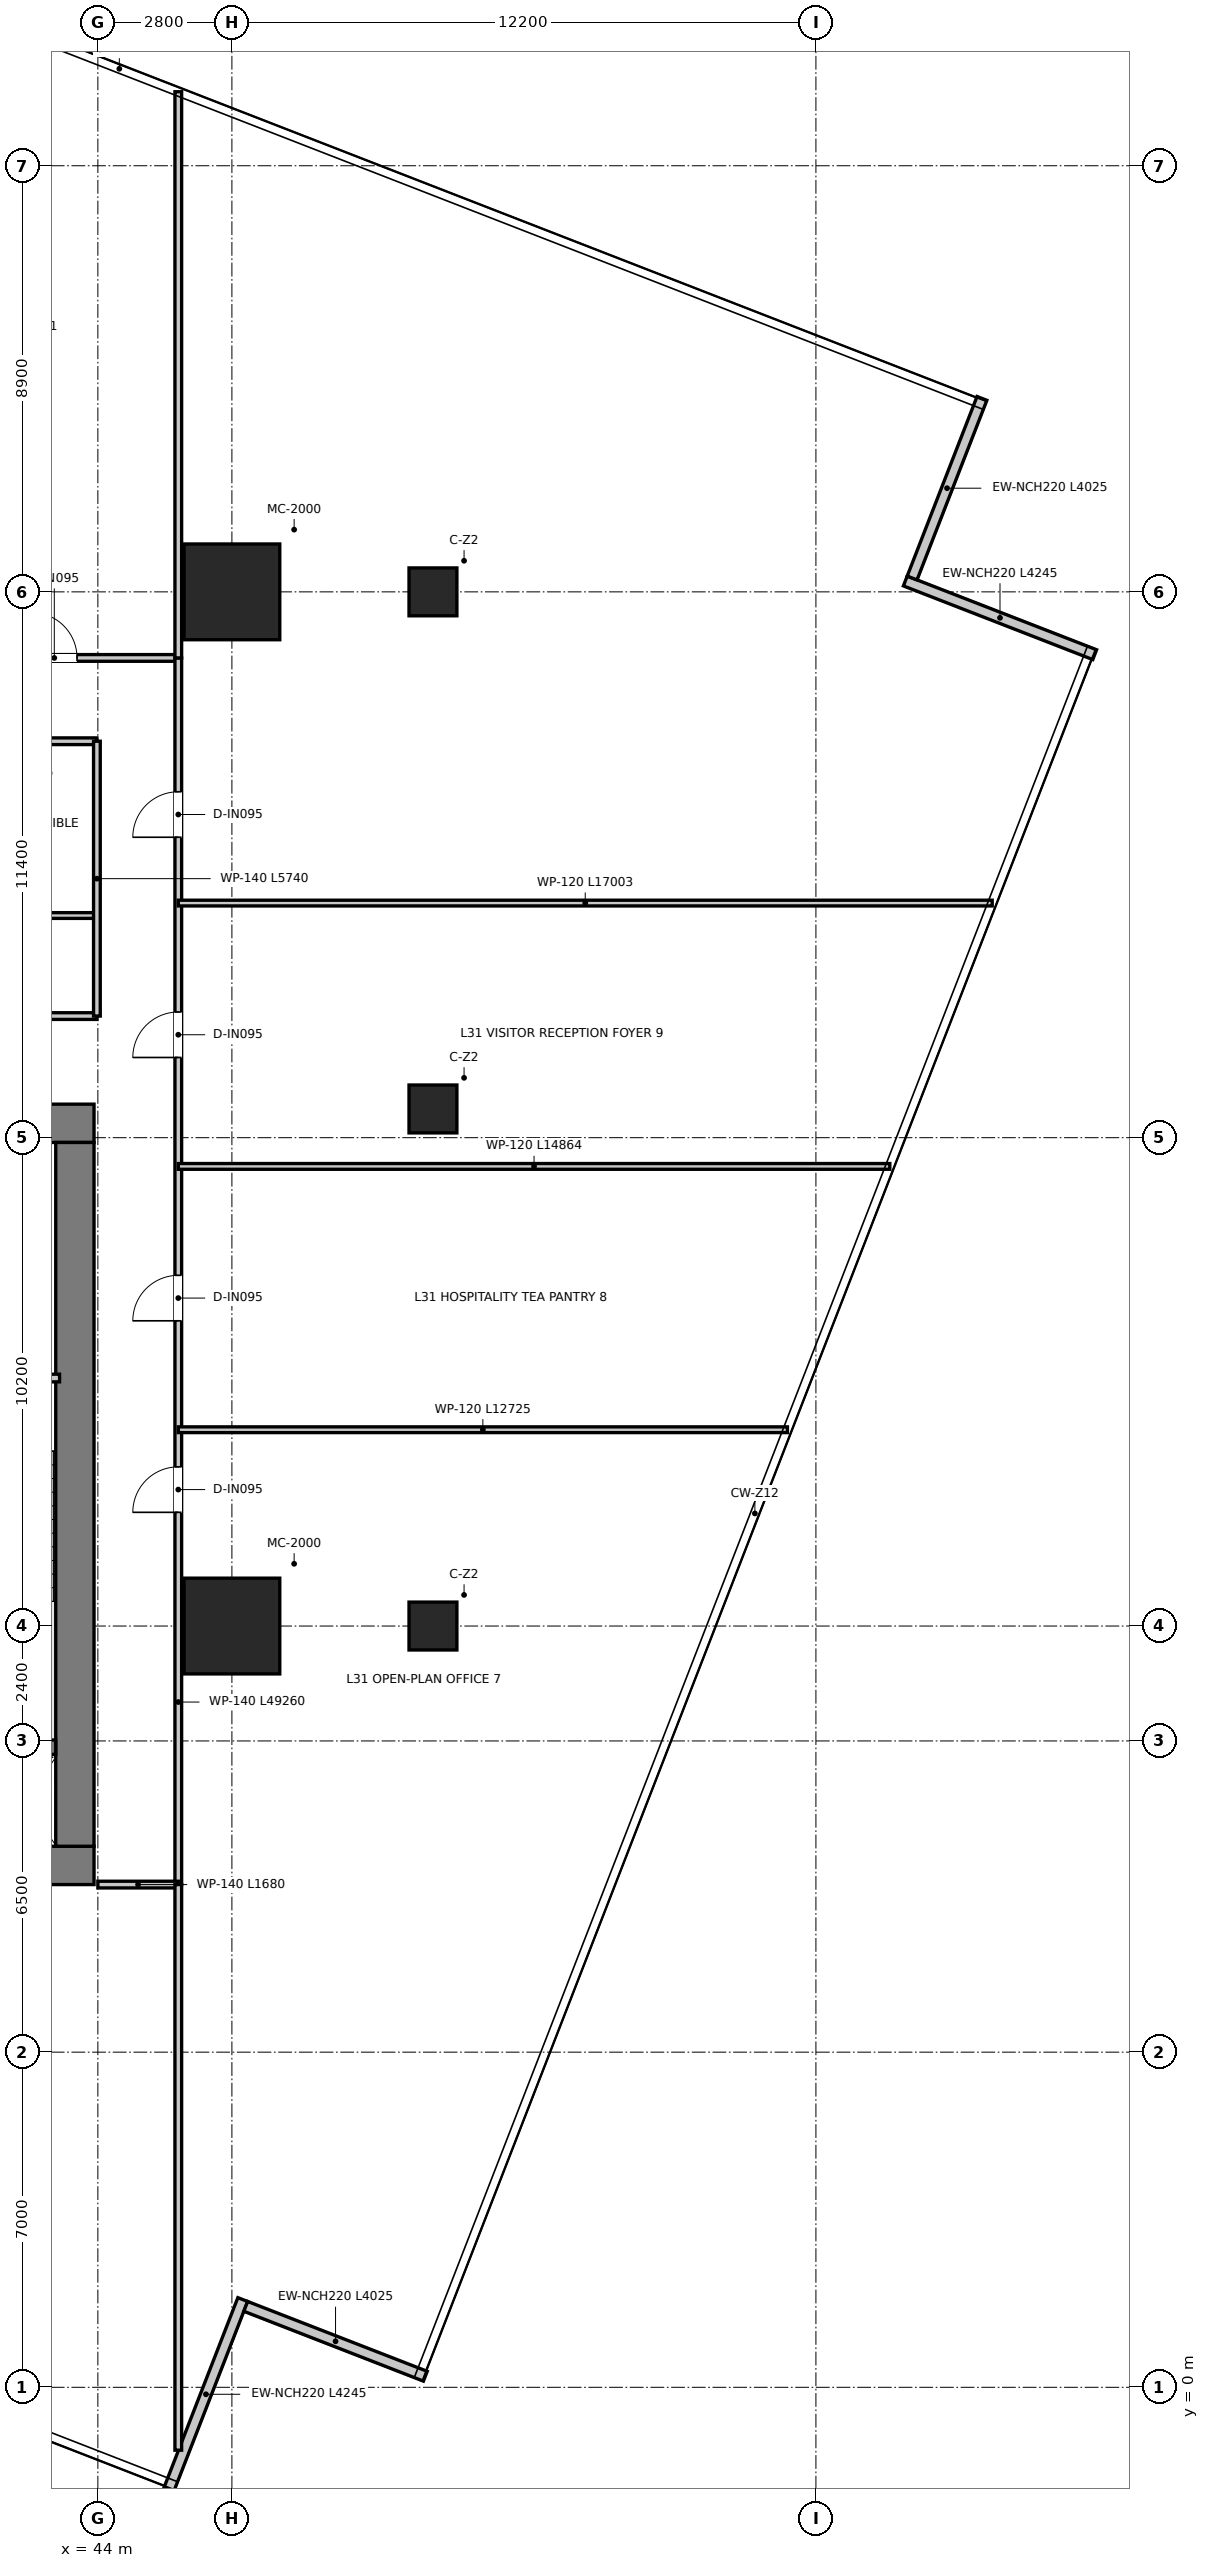
"""IFC4 building model, lengths in metres.
Left out: names, types, materials, properties, quantities, classifications, styles, units other than length and angle.
Written with IfcOpenShell. Run it as: python <this file> out.ifc"""

import sys

from ifc_helpers import new_model, si_unit, direction, frame, frame_2d, origin, origin_2d, place, context, subcontext, project, spatial, rectangle, extrude, source, transform, mapped, element, fill, save


model = new_model("IFC4")
c1 = context("Model", 3, precision=1e-05, world=origin(), true_north=direction((0.0, 1.0)))
c2 = subcontext(c1, "Body", "Model", "MODEL_VIEW")
j1 = project(units=[si_unit("LENGTHUNIT", "METRE"), si_unit("PLANEANGLEUNIT", "RADIAN")], contexts=[c1])
p1 = place(None, origin())
s1 = spatial("IfcSite", under=j1, at=p1, CompositionType="ELEMENT")
p2 = place(p1, origin())
s2 = spatial("IfcBuilding", under=s1, at=p2, CompositionType="ELEMENT")
p3 = place(p2, frame((0.0, 0.0, 129.55)))
s3 = spatial("IfcBuildingStorey", under=s2, at=p3, CompositionType="ELEMENT", Elevation=129.55)
p4 = place(p3, frame((28.08, 10.9, 0.0), z_axis=(0.0, 0.0, 1.0), x_axis=(1.0, 0.0, 0.0)))
e1 = element("IfcWall", 1, at=p4, inside=s3, PredefinedType="SHEAR", context=c2, shape_type="SweptSolid", body=[
    extrude(rectangle(XDim=15.84, YDim=0.8, at=frame_2d((7.92, 0.0))), origin(), (0.0, 0.0, 1.0), 3.95),
])
p5 = place(p3, frame((28.08, 26.4, 0.0), z_axis=(0.0, 0.0, 1.0), x_axis=(1.0, 0.0, 0.0)))
e2 = element("IfcWall", 2, at=p5, inside=s3, PredefinedType="SHEAR", context=c2, shape_type="SweptSolid", body=[
    extrude(rectangle(XDim=15.84, YDim=0.8, at=frame_2d((7.92, 0.0))), origin(), (0.0, 0.0, 1.0), 3.95),
])
p6 = place(p5, frame((7.22, 0.0, 0.0)))
e3 = element("IfcOpeningElement", 3, at=p6, cuts=e2, PredefinedType="OPENING", context=c2, shape_type="SweptSolid", body=[
    extrude(rectangle(XDim=1.4, YDim=2.2, at=frame_2d((0.7, 1.1))), frame((0.0, 0.41, 0.0), z_axis=(0.0, -1.0, 0.0), x_axis=(1.0, 0.0, 0.0)), (0.0, 0.0, 1.0), 0.82),
])
p7 = place(p5, frame((1.775, 0.0, 0.0)))
e4 = element("IfcOpeningElement", 4, at=p7, cuts=e2, PredefinedType="OPENING", context=c2, shape_type="SweptSolid", body=[
    extrude(rectangle(XDim=1.05, YDim=2.1, at=frame_2d((0.525, 1.05))), frame((0.0, 0.41, 0.0), z_axis=(0.0, -1.0, 0.0), x_axis=(1.0, 0.0, 0.0)), (0.0, 0.0, 1.0), 0.82),
])
p8 = place(p5, frame((13.015, 0.0, 0.0)))
e5 = element("IfcOpeningElement", 5, at=p8, cuts=e2, PredefinedType="OPENING", context=c2, shape_type="SweptSolid", body=[
    extrude(rectangle(XDim=1.05, YDim=2.1, at=frame_2d((0.525, 1.05))), frame((0.0, 0.41, 0.0), z_axis=(0.0, -1.0, 0.0), x_axis=(1.0, 0.0, 0.0)), (0.0, 0.0, 1.0), 0.82),
])
p9 = place(p3, frame((43.52, 11.3, 0.0), z_axis=(0.0, 0.0, 1.0), x_axis=(0.0, 1.0, 0.0)))
e6 = element("IfcWall", 6, at=p9, inside=s3, PredefinedType="SHEAR", context=c2, shape_type="SweptSolid", body=[
    extrude(rectangle(XDim=14.7, YDim=0.8, at=frame_2d((7.35, 0.0))), origin(), (0.0, 0.0, 1.0), 3.95),
])
p10 = place(p3, frame((40.02, 13.37, 0.0), z_axis=(0.0, 0.0, 1.0), x_axis=(1.0, 0.0, 0.0)))
e7 = element("IfcWall", 7, at=p10, inside=s3, PredefinedType="SHEAR", context=c2, shape_type="SweptSolid", body=[
    extrude(rectangle(XDim=3.1, YDim=0.3, at=frame_2d((1.55, 0.0))), origin(), (0.0, 0.0, 1.0), 3.95),
])
m1 = source(origin(), c2, "Body", "SweptSolid", [
    extrude(rectangle(XDim=2.0, YDim=2.0, at=origin_2d()), origin(), (0.0, 0.0, 1.0), 3.95),
])
for number, where, z_axis, x_axis in (
    (8, (46.8, 15.9, 0.0), (0.0, 0.0, 1.0), (1.0, 0.0, 0.0)),
    (9, (46.8, 37.5, 0.0), (0.0, 0.0, 1.0), (1.0, 0.0, 0.0)),
):
    element("IfcColumn", number, at=place(p3, frame(where, z_axis=z_axis, x_axis=x_axis)), inside=s3, PredefinedType="USERDEFINED", context=c2, shape_type="MappedRepresentation", body=[
        mapped(m1, transform((0.0, 0.0, 0.0), x_axis=(1.0, 0.0, 0.0), y_axis=(0.0, 1.0, 0.0), z_axis=(0.0, 0.0, 1.0), scale=1.0)),
    ])
m2 = source(origin(), c2, "Body", "SweptSolid", [
    extrude(rectangle(XDim=1.0, YDim=1.0, at=origin_2d()), origin(), (0.0, 0.0, 1.0), 3.95),
])
for number, where, z_axis, x_axis in (
    (10, (51.0, 37.5, 0.0), (0.0, 0.0, 1.0), (1.0, 0.0, 0.0)),
    (11, (51.0, 26.7, 0.0), (0.0, 0.0, 1.0), (1.0, 0.0, 0.0)),
    (12, (51.0, 15.9, 0.0), (0.0, 0.0, 1.0), (1.0, 0.0, 0.0)),
):
    element("IfcColumn", number, at=place(p3, frame(where, z_axis=z_axis, x_axis=x_axis)), inside=s3, PredefinedType="COLUMN", context=c2, shape_type="MappedRepresentation", body=[
        mapped(m2, transform((0.0, 0.0, 0.0), x_axis=(1.0, 0.0, 0.0), y_axis=(0.0, 1.0, 0.0), z_axis=(0.0, 0.0, 1.0), scale=1.0)),
    ])
p11 = place(p3, frame((45.488, -2.124, 0.0), z_axis=(0.0, 0.0, 1.0), x_axis=(0.362429609335, 0.932011147078, 0.0)))
e13 = element("IfcWall", 13, at=p11, inside=s3, PredefinedType="ELEMENTEDWALL", context=c2, shape_type="SweptSolid", body=[
    extrude(rectangle(XDim=4.245, YDim=0.22, at=frame_2d((2.123, 0.0))), origin(), (0.0, 0.0, 1.0), 3.67),
])
p12 = place(p3, frame((47.09, 1.69, 0.0), z_axis=(0.0, 0.0, 1.0), x_axis=(0.932010363197, -0.362431625129, 0.0)))
e14 = element("IfcWall", 14, at=p12, inside=s3, PredefinedType="ELEMENTEDWALL", context=c2, shape_type="SweptSolid", body=[
    extrude(rectangle(XDim=4.025, YDim=0.22, at=frame_2d((2.012, 0.0))), origin(), (0.0, 0.0, 1.0), 3.67),
])
p13 = place(p3, frame((64.824, 36.188, 0.0), z_axis=(0.0, 0.0, 1.0), x_axis=(-0.932003592198, 0.362449036596, 0.0)))
e15 = element("IfcWall", 15, at=p13, inside=s3, PredefinedType="ELEMENTEDWALL", context=c2, shape_type="SweptSolid", body=[
    extrude(rectangle(XDim=4.245, YDim=0.22, at=frame_2d((2.123, 0.0))), origin(), (0.0, 0.0, 1.0), 3.67),
])
p14 = place(p3, frame((61.01, 37.79, 0.0), z_axis=(0.0, 0.0, 1.0), x_axis=(0.362431625129, 0.932010363197, 0.0)))
e16 = element("IfcWall", 16, at=p14, inside=s3, PredefinedType="ELEMENTEDWALL", context=c2, shape_type="SweptSolid", body=[
    extrude(rectangle(XDim=4.025, YDim=0.22, at=frame_2d((2.012, 0.0))), origin(), (0.0, 0.0, 1.0), 3.67),
])
p15 = place(p3, frame((40.04, 21.08, 0.0), z_axis=(0.0, 0.0, 1.0), x_axis=(1.0, 0.0, 0.0)))
e17 = element("IfcWall", 17, at=p15, inside=s3, PredefinedType="PARTITIONING", context=c2, shape_type="SweptSolid", body=[
    extrude(rectangle(XDim=3.16, YDim=0.16, at=frame_2d((1.58, 0.0))), origin(), (0.0, 0.0, 1.0), 3.67),
])
p16 = place(p15, frame((1.055, 0.0, 0.0)))
e18 = element("IfcOpeningElement", 18, at=p16, cuts=e17, PredefinedType="OPENING", context=c2, shape_type="SweptSolid", body=[
    extrude(rectangle(XDim=1.05, YDim=2.1, at=frame_2d((0.525, 1.05))), frame((0.0, 0.09, 0.0), z_axis=(0.0, -1.0, 0.0), x_axis=(1.0, 0.0, 0.0)), (0.0, 0.0, 1.0), 0.18),
])
p17 = place(p3, frame((28.02, 28.64, 0.0), z_axis=(0.0, 0.0, 1.0), x_axis=(1.0, 0.0, 0.0)))
e19 = element("IfcWall", 19, at=p17, inside=s3, PredefinedType="PARTITIONING", context=c2, shape_type="SweptSolid", body=[
    extrude(rectangle(XDim=15.96, YDim=0.14, at=frame_2d((7.98, 0.0))), origin(), (0.0, 0.0, 1.0), 3.08),
])
p18 = place(p17, frame((7.455, 0.0, 0.0)))
e20 = element("IfcOpeningElement", 20, at=p18, cuts=e19, PredefinedType="OPENING", context=c2, shape_type="SweptSolid", body=[
    extrude(rectangle(XDim=1.05, YDim=2.15, at=frame_2d((0.525, 1.075))), frame((0.0, 0.08, 0.0), z_axis=(0.0, -1.0, 0.0), x_axis=(1.0, 0.0, 0.0)), (0.0, 0.0, 1.0), 0.16),
])
p19 = place(p3, frame((28.02, 30.74, 0.0), z_axis=(0.0, 0.0, 1.0), x_axis=(1.0, 0.0, 0.0)))
e21 = element("IfcWall", 21, at=p19, inside=s3, PredefinedType="PARTITIONING", context=c2, shape_type="SweptSolid", body=[
    extrude(rectangle(XDim=15.96, YDim=0.12, at=frame_2d((7.98, 0.0))), origin(), (0.0, 0.0, 1.0), 3.08),
])
p20 = place(p3, frame((28.02, 34.38, 0.0), z_axis=(0.0, 0.0, 1.0), x_axis=(1.0, 0.0, 0.0)))
e22 = element("IfcWall", 22, at=p20, inside=s3, PredefinedType="PARTITIONING", context=c2, shape_type="SweptSolid", body=[
    extrude(rectangle(XDim=15.96, YDim=0.14, at=frame_2d((7.98, 0.0))), origin(), (0.0, 0.0, 1.0), 3.08),
])
p21 = place(p20, frame((7.83, 0.0, 0.0)))
e23 = element("IfcOpeningElement", 23, at=p21, cuts=e22, PredefinedType="OPENING", context=c2, shape_type="SweptSolid", body=[
    extrude(rectangle(XDim=0.9, YDim=2.1, at=frame_2d((0.45, 1.05))), frame((0.0, 0.08, 0.0), z_axis=(0.0, -1.0, 0.0), x_axis=(1.0, 0.0, 0.0)), (0.0, 0.0, 1.0), 0.16),
])
p22 = place(p20, frame((11.03, 0.0, 0.0)))
e24 = element("IfcOpeningElement", 24, at=p22, cuts=e22, PredefinedType="OPENING", context=c2, shape_type="SweptSolid", body=[
    extrude(rectangle(XDim=0.9, YDim=2.1, at=frame_2d((0.45, 1.05))), frame((0.0, 0.08, 0.0), z_axis=(0.0, -1.0, 0.0), x_axis=(1.0, 0.0, 0.0)), (0.0, 0.0, 1.0), 0.16),
])
p23 = place(p20, frame((14.055, 0.0, 0.0)))
e25 = element("IfcOpeningElement", 25, at=p23, cuts=e22, PredefinedType="OPENING", context=c2, shape_type="SweptSolid", body=[
    extrude(rectangle(XDim=0.95, YDim=2.1, at=frame_2d((0.475, 1.05))), frame((0.0, 0.08, 0.0), z_axis=(0.0, -1.0, 0.0), x_axis=(1.0, 0.0, 0.0)), (0.0, 0.0, 1.0), 0.16),
])
p24 = place(p20, frame((2.855, 0.0, 0.0)))
e26 = element("IfcOpeningElement", 26, at=p24, cuts=e22, PredefinedType="OPENING", context=c2, shape_type="SweptSolid", body=[
    extrude(rectangle(XDim=0.95, YDim=2.1, at=frame_2d((0.475, 1.05))), frame((0.0, 0.08, 0.0), z_axis=(0.0, -1.0, 0.0), x_axis=(1.0, 0.0, 0.0)), (0.0, 0.0, 1.0), 0.16),
])
p25 = place(p3, frame((43.98, 28.64, 0.0), z_axis=(0.0, 0.0, 1.0), x_axis=(0.0, 1.0, 0.0)))
e27 = element("IfcWall", 27, at=p25, inside=s3, PredefinedType="PARTITIONING", context=c2, shape_type="SweptSolid", body=[
    extrude(rectangle(XDim=5.74, YDim=0.14, at=frame_2d((2.87, 0.0))), origin(), (0.0, 0.0, 1.0), 3.27),
])
p26 = place(p3, frame((26.32, 36.12, 0.0), z_axis=(0.0, 0.0, 1.0), x_axis=(1.0, 0.0, 0.0)))
e28 = element("IfcWall", 28, at=p26, inside=s3, PredefinedType="PARTITIONING", context=c2, shape_type="SweptSolid", body=[
    extrude(rectangle(XDim=19.36, YDim=0.14, at=frame_2d((9.68, 0.0))), origin(), (0.0, 0.0, 1.0), 3.08),
])
p27 = place(p26, frame((3.115, 0.0, 0.0)))
e29 = element("IfcOpeningElement", 29, at=p27, cuts=e28, PredefinedType="OPENING", context=c2, shape_type="SweptSolid", body=[
    extrude(rectangle(XDim=0.95, YDim=2.1, at=frame_2d((0.475, 1.05))), frame((0.0, 0.08, 0.0), z_axis=(0.0, -1.0, 0.0), x_axis=(1.0, 0.0, 0.0)), (0.0, 0.0, 1.0), 0.16),
])
p28 = place(p26, frame((10.205, 0.0, 0.0)))
e30 = element("IfcOpeningElement", 30, at=p28, cuts=e28, PredefinedType="OPENING", context=c2, shape_type="SweptSolid", body=[
    extrude(rectangle(XDim=0.95, YDim=2.1, at=frame_2d((0.475, 1.05))), frame((0.0, 0.08, 0.0), z_axis=(0.0, -1.0, 0.0), x_axis=(1.0, 0.0, 0.0)), (0.0, 0.0, 1.0), 0.16),
])
p29 = place(p26, frame((16.295, 0.0, 0.0)))
e31 = element("IfcOpeningElement", 31, at=p29, cuts=e28, PredefinedType="OPENING", context=c2, shape_type="SweptSolid", body=[
    extrude(rectangle(XDim=0.95, YDim=2.1, at=frame_2d((0.475, 1.05))), frame((0.0, 0.08, 0.0), z_axis=(0.0, -1.0, 0.0), x_axis=(1.0, 0.0, 0.0)), (0.0, 0.0, 1.0), 0.16),
])
p30 = place(p3, frame((45.68, 10.5, 0.0), z_axis=(0.0, 0.0, 1.0), x_axis=(0.0, 1.0, 0.0)))
e32 = element("IfcWall", 32, at=p30, inside=s3, PredefinedType="PARTITIONING", context=c2, shape_type="SweptSolid", body=[
    extrude(rectangle(XDim=25.62, YDim=0.14, at=frame_2d((12.81, 0.0))), origin(), (0.0, 0.0, 1.0), 2.97),
])
p31 = place(p30, frame((7.775, 0.0, 0.0)))
e33 = element("IfcOpeningElement", 33, at=p31, cuts=e32, PredefinedType="OPENING", context=c2, shape_type="SweptSolid", body=[
    extrude(rectangle(XDim=0.95, YDim=2.1, at=frame_2d((0.475, 1.05))), frame((0.0, 0.08, 0.0), z_axis=(0.0, -1.0, 0.0), x_axis=(1.0, 0.0, 0.0)), (0.0, 0.0, 1.0), 0.16),
])
p32 = place(p30, frame((11.775, 0.0, 0.0)))
e34 = element("IfcOpeningElement", 34, at=p32, cuts=e32, PredefinedType="OPENING", context=c2, shape_type="SweptSolid", body=[
    extrude(rectangle(XDim=0.95, YDim=2.1, at=frame_2d((0.475, 1.05))), frame((0.0, 0.08, 0.0), z_axis=(0.0, -1.0, 0.0), x_axis=(1.0, 0.0, 0.0)), (0.0, 0.0, 1.0), 0.16),
])
p33 = place(p30, frame((17.275, 0.0, 0.0)))
e35 = element("IfcOpeningElement", 35, at=p33, cuts=e32, PredefinedType="OPENING", context=c2, shape_type="SweptSolid", body=[
    extrude(rectangle(XDim=0.95, YDim=2.1, at=frame_2d((0.475, 1.05))), frame((0.0, 0.08, 0.0), z_axis=(0.0, -1.0, 0.0), x_axis=(1.0, 0.0, 0.0)), (0.0, 0.0, 1.0), 0.16),
])
p34 = place(p30, frame((21.875, 0.0, 0.0)))
e36 = element("IfcOpeningElement", 36, at=p34, cuts=e32, PredefinedType="OPENING", context=c2, shape_type="SweptSolid", body=[
    extrude(rectangle(XDim=0.95, YDim=2.1, at=frame_2d((0.475, 1.05))), frame((0.0, 0.08, 0.0), z_axis=(0.0, -1.0, 0.0), x_axis=(1.0, 0.0, 0.0)), (0.0, 0.0, 1.0), 0.16),
])
p35 = place(p3, frame((44.0, 10.5, 0.0), z_axis=(0.0, 0.0, 1.0), x_axis=(1.0, 0.0, 0.0)))
e37 = element("IfcWall", 37, at=p35, inside=s3, PredefinedType="PARTITIONING", context=c2, shape_type="SweptSolid", body=[
    extrude(rectangle(XDim=1.68, YDim=0.14, at=frame_2d((0.84, 0.0))), origin(), (0.0, 0.0, 1.0), 3.67),
])
p36 = place(p3, frame((45.68, 36.12, 0.0), z_axis=(0.0, 0.0, 1.0), x_axis=(0.0, 1.0, 0.0)))
e38 = element("IfcWall", 38, at=p36, inside=s3, PredefinedType="PARTITIONING", context=c2, shape_type="SweptSolid", body=[
    extrude(rectangle(XDim=11.826, YDim=0.14, at=frame_2d((5.913, 0.0))), origin(), (0.0, 0.0, 1.0), 2.97),
])
p37 = place(p3, frame((45.68, -1.313, 0.0), z_axis=(0.0, 0.0, 1.0), x_axis=(0.0, 1.0, 0.0)))
e39 = element("IfcWall", 39, at=p37, inside=s3, PredefinedType="PARTITIONING", context=c2, shape_type="SweptSolid", body=[
    extrude(rectangle(XDim=11.813, YDim=0.14, at=frame_2d((5.907, 0.0))), origin(), (0.0, 0.0, 1.0), 3.67),
])
p38 = place(p3, frame((45.68, 20.0, 0.0), z_axis=(0.0, 0.0, 1.0), x_axis=(1.0, 0.0, 0.0)))
e40 = element("IfcWall", 40, at=p38, inside=s3, PredefinedType="PARTITIONING", context=c2, shape_type="SweptSolid", body=[
    extrude(rectangle(XDim=12.725, YDim=0.12, at=frame_2d((6.363, 0.0))), origin(), (0.0, 0.0, 1.0), 2.97),
])
p39 = place(p3, frame((45.68, 25.5, 0.0), z_axis=(0.0, 0.0, 1.0), x_axis=(1.0, 0.0, 0.0)))
e41 = element("IfcWall", 41, at=p39, inside=s3, PredefinedType="PARTITIONING", context=c2, shape_type="SweptSolid", body=[
    extrude(rectangle(XDim=14.864, YDim=0.12, at=frame_2d((7.432, 0.0))), origin(), (0.0, 0.0, 1.0), 2.97),
])
p40 = place(p3, frame((45.68, 31.0, 0.0), z_axis=(0.0, 0.0, 1.0), x_axis=(1.0, 0.0, 0.0)))
e42 = element("IfcWall", 42, at=p40, inside=s3, PredefinedType="PARTITIONING", context=c2, shape_type="SweptSolid", body=[
    extrude(rectangle(XDim=17.003, YDim=0.12, at=frame_2d((8.501, 0.0))), origin(), (0.0, 0.0, 1.0), 2.97),
])
p41 = place(p29, origin())
e43 = element("IfcDoor", 43, at=p41, inside=s3, OperationType="SINGLE_SWING_LEFT", PredefinedType="DOOR", context=c2, shape_type="SweptSolid", body=[
    extrude(rectangle(XDim=0.95, YDim=2.1, at=frame_2d((0.475, 1.05))), frame((0.0, 0.025, 0.0), z_axis=(0.0, -1.0, 0.0), x_axis=(1.0, 0.0, 0.0)), (0.0, 0.0, 1.0), 0.05),
])
fill(e31, e43)
p42 = place(p31, origin())
e44 = element("IfcDoor", 44, at=p42, inside=s3, OperationType="SINGLE_SWING_LEFT", PredefinedType="DOOR", context=c2, shape_type="SweptSolid", body=[
    extrude(rectangle(XDim=0.95, YDim=2.1, at=frame_2d((0.475, 1.05))), frame((0.0, 0.025, 0.0), z_axis=(0.0, -1.0, 0.0), x_axis=(1.0, 0.0, 0.0)), (0.0, 0.0, 1.0), 0.05),
])
fill(e33, e44)
p43 = place(p32, origin())
e45 = element("IfcDoor", 45, at=p43, inside=s3, OperationType="SINGLE_SWING_LEFT", PredefinedType="DOOR", context=c2, shape_type="SweptSolid", body=[
    extrude(rectangle(XDim=0.95, YDim=2.1, at=frame_2d((0.475, 1.05))), frame((0.0, 0.025, 0.0), z_axis=(0.0, -1.0, 0.0), x_axis=(1.0, 0.0, 0.0)), (0.0, 0.0, 1.0), 0.05),
])
fill(e34, e45)
p44 = place(p33, origin())
e46 = element("IfcDoor", 46, at=p44, inside=s3, OperationType="SINGLE_SWING_LEFT", PredefinedType="DOOR", context=c2, shape_type="SweptSolid", body=[
    extrude(rectangle(XDim=0.95, YDim=2.1, at=frame_2d((0.475, 1.05))), frame((0.0, 0.025, 0.0), z_axis=(0.0, -1.0, 0.0), x_axis=(1.0, 0.0, 0.0)), (0.0, 0.0, 1.0), 0.05),
])
fill(e35, e46)
p45 = place(p34, origin())
e47 = element("IfcDoor", 47, at=p45, inside=s3, OperationType="SINGLE_SWING_LEFT", PredefinedType="DOOR", context=c2, shape_type="SweptSolid", body=[
    extrude(rectangle(XDim=0.95, YDim=2.1, at=frame_2d((0.475, 1.05))), frame((0.0, 0.025, 0.0), z_axis=(0.0, -1.0, 0.0), x_axis=(1.0, 0.0, 0.0)), (0.0, 0.0, 1.0), 0.05),
])
fill(e36, e47)
save(model, sys.argv[1])
